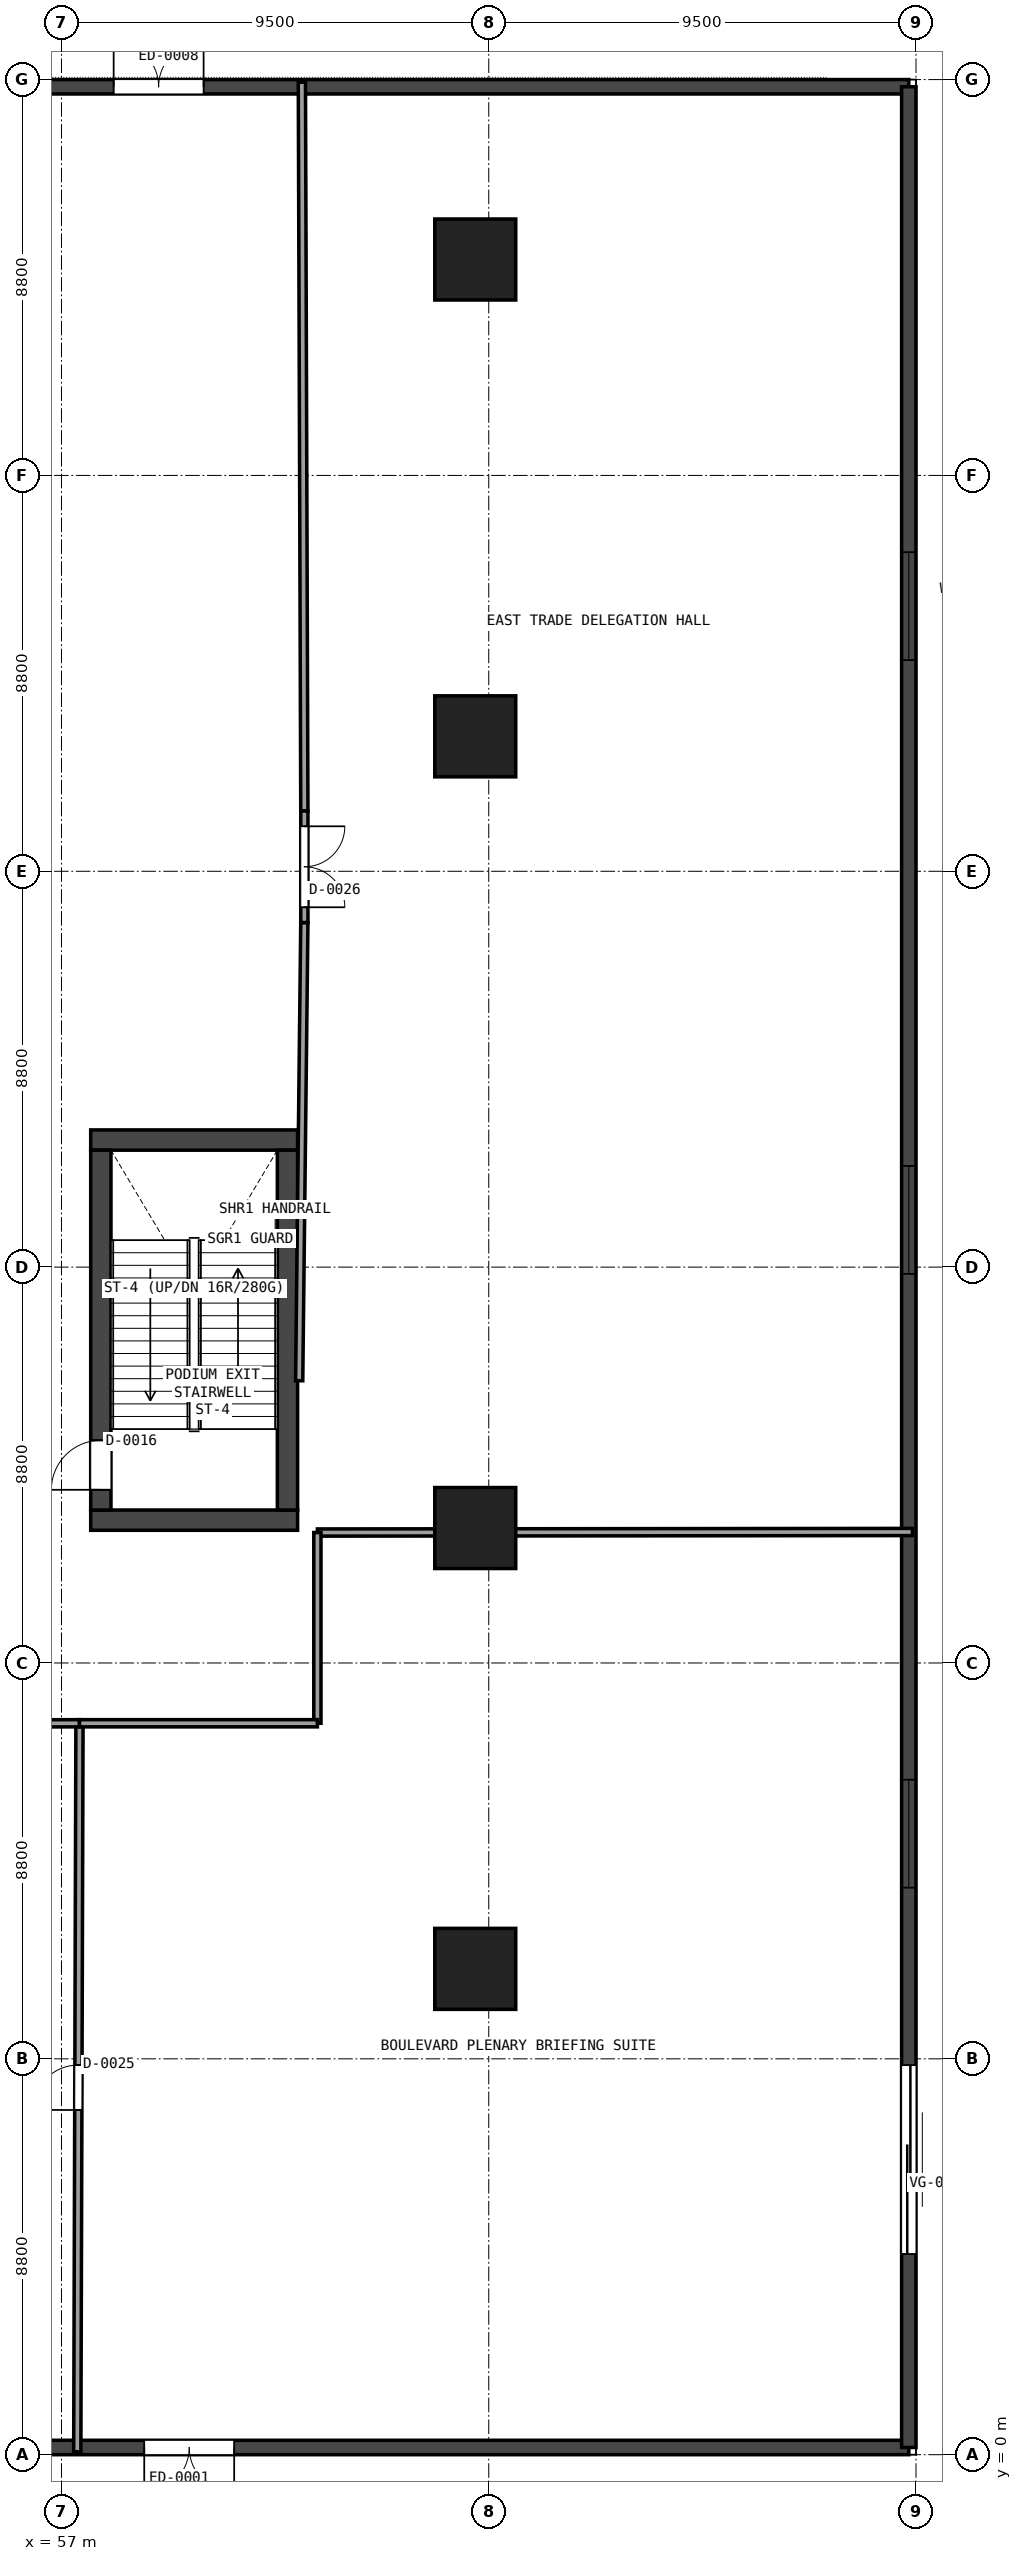
"""IFC4 building model, lengths in metres.
Left out: names, types, materials, properties, quantities, classifications, styles, units other than length and angle.
Written with IfcOpenShell. Run it as: python <this file> out.ifc"""

import sys

from ifc_helpers import new_model, si_unit, direction, frame, frame_2d, origin, origin_2d, place, context, subcontext, project, spatial, rectangle, extrude, element, fill, save


model = new_model("IFC4")
c1 = context("Model", 3, precision=1e-05, world=origin(), true_north=direction((0.0, 1.0)))
c2 = subcontext(c1, "Body", "Model", "MODEL_VIEW")
j1 = project(units=[si_unit("LENGTHUNIT", "METRE"), si_unit("PLANEANGLEUNIT", "RADIAN")], contexts=[c1])
p1 = place(None, origin())
s1 = spatial("IfcSite", under=j1, at=p1, CompositionType="ELEMENT")
p2 = place(p1, origin())
s2 = spatial("IfcBuilding", under=s1, at=p2, CompositionType="ELEMENT")
p3 = place(p2, origin())
s3 = spatial("IfcBuildingStorey", under=s2, at=p3, CompositionType="ELEMENT", Elevation=0.0)
for number, where, z_axis, x_axis in (
    (1, (57.65, 20.775, 0.0), (0.0, 0.0, 1.0), (1.0, 0.0, 0.0)),
    (2, (57.65, 29.225, 0.0), (0.0, 0.0, 1.0), (1.0, 0.0, 0.0)),
):
    element("IfcWall", number, at=place(p3, frame(where, z_axis=z_axis, x_axis=x_axis)), inside=s3, PredefinedType="SHEAR", context=c2, shape_type="SweptSolid", body=[
        extrude(rectangle(XDim=4.6, YDim=0.45, at=frame_2d((2.3, 0.0))), origin(), (0.0, 0.0, 1.0), 5.05),
    ])
p4 = place(p3, frame((57.875, 21.0, 0.0), z_axis=(0.0, 0.0, 1.0), x_axis=(0.0, 1.0, 0.0)))
e3 = element("IfcWall", 3, at=p4, inside=s3, PredefinedType="SHEAR", context=c2, shape_type="SweptSolid", body=[
    extrude(rectangle(XDim=8.0, YDim=0.45, at=frame_2d((4.0, 0.0))), origin(), (0.0, 0.0, 1.0), 5.05),
])
p5 = place(p4, frame((0.45, 0.0, 0.0)))
e4 = element("IfcOpeningElement", 4, at=p5, cuts=e3, PredefinedType="OPENING", context=c2, shape_type="SweptSolid", body=[
    extrude(rectangle(XDim=1.1, YDim=2.15, at=frame_2d((0.55, 1.075))), frame((0.0, 0.235, 0.0), z_axis=(0.0, -1.0, 0.0), x_axis=(1.0, 0.0, 0.0)), (0.0, 0.0, 1.0), 0.47),
])
p6 = place(p3, frame((62.025, 21.0, 0.0), z_axis=(0.0, 0.0, 1.0), x_axis=(0.0, 1.0, 0.0)))
e5 = element("IfcWall", 5, at=p6, inside=s3, PredefinedType="SHEAR", context=c2, shape_type="SweptSolid", body=[
    extrude(rectangle(XDim=8.0, YDim=0.45, at=frame_2d((4.0, 0.0))), origin(), (0.0, 0.0, 1.0), 5.05),
])
for number, where, z_axis, x_axis in (
    (6, (66.2, 10.8, 0.0), (0.0, 0.0, 1.0), (1.0, 0.0, 0.0)),
    (7, (66.2, 20.6, 0.0), (0.0, 0.0, 1.0), (1.0, 0.0, 0.0)),
    (8, (66.2, 38.2, 0.0), (0.0, 0.0, 1.0), (1.0, 0.0, 0.0)),
    (9, (66.2, 48.8, 0.0), (0.0, 0.0, 1.0), (1.0, 0.0, 0.0)),
):
    element("IfcColumn", number, at=place(p3, frame(where, z_axis=z_axis, x_axis=x_axis)), inside=s3, PredefinedType="COLUMN", context=c2, shape_type="SweptSolid", body=[
        extrude(rectangle(XDim=1.8, YDim=1.8, at=origin_2d()), origin(), (0.0, 0.0, 1.0), 5.05),
    ])
p7 = place(p3, frame((75.84, 0.16, 0.0), z_axis=(0.0, 0.0, 1.0), x_axis=(-1.0, 0.0, 0.0)))
e10 = element("IfcWall", 10, at=p7, inside=s3, PredefinedType="SOLIDWALL", context=c2, shape_type="SweptSolid", body=[
    extrude(rectangle(XDim=75.68, YDim=0.32, at=frame_2d((37.84, 0.0))), origin(), (0.0, 0.0, 1.0), 5.05),
])
p8 = place(p7, frame((15.0, 0.0, 0.0)))
e11 = element("IfcOpeningElement", 11, at=p8, cuts=e10, PredefinedType="OPENING", context=c2, shape_type="SweptSolid", body=[
    extrude(rectangle(XDim=2.0, YDim=2.4, at=frame_2d((1.0, 1.2))), frame((0.0, 0.17, 0.0), z_axis=(0.0, -1.0, 0.0), x_axis=(1.0, 0.0, 0.0)), (0.0, 0.0, 1.0), 0.34),
])
p9 = place(p7, frame((29.5, 0.0, 0.0)))
e12 = element("IfcOpeningElement", 12, at=p9, cuts=e10, PredefinedType="OPENING", context=c2, shape_type="SweptSolid", body=[
    extrude(rectangle(XDim=2.0, YDim=2.4, at=frame_2d((1.0, 1.2))), frame((0.0, 0.17, 0.0), z_axis=(0.0, -1.0, 0.0), x_axis=(1.0, 0.0, 0.0)), (0.0, 0.0, 1.0), 0.34),
])
p10 = place(p7, frame((42.5, 0.0, 0.0)))
e13 = element("IfcOpeningElement", 13, at=p10, cuts=e10, PredefinedType="OPENING", context=c2, shape_type="SweptSolid", body=[
    extrude(rectangle(XDim=2.0, YDim=2.4, at=frame_2d((1.0, 1.2))), frame((0.0, 0.17, 0.0), z_axis=(0.0, -1.0, 0.0), x_axis=(1.0, 0.0, 0.0)), (0.0, 0.0, 1.0), 0.34),
])
p11 = place(p7, frame((58.0, 0.0, 0.0)))
e14 = element("IfcOpeningElement", 14, at=p11, cuts=e10, PredefinedType="OPENING", context=c2, shape_type="SweptSolid", body=[
    extrude(rectangle(XDim=2.0, YDim=2.4, at=frame_2d((1.0, 1.2))), frame((0.0, 0.17, 0.0), z_axis=(0.0, -1.0, 0.0), x_axis=(1.0, 0.0, 0.0)), (0.0, 0.0, 1.0), 0.34),
])
p12 = place(p3, frame((0.16, 52.64, 0.0), z_axis=(0.0, 0.0, 1.0), x_axis=(1.0, 0.0, 0.0)))
e15 = element("IfcWall", 15, at=p12, inside=s3, PredefinedType="SOLIDWALL", context=c2, shape_type="SweptSolid", body=[
    extrude(rectangle(XDim=75.68, YDim=0.32, at=frame_2d((37.84, 0.0))), origin(), (0.0, 0.0, 1.0), 5.05),
])
p13 = place(p12, frame((15.0, 0.0, 0.0)))
e16 = element("IfcOpeningElement", 16, at=p13, cuts=e15, PredefinedType="OPENING", context=c2, shape_type="SweptSolid", body=[
    extrude(rectangle(XDim=2.0, YDim=2.4, at=frame_2d((1.0, 1.2))), frame((0.0, 0.17, 0.0), z_axis=(0.0, -1.0, 0.0), x_axis=(1.0, 0.0, 0.0)), (0.0, 0.0, 1.0), 0.34),
])
p14 = place(p12, frame((29.5, 0.0, 0.0)))
e17 = element("IfcOpeningElement", 17, at=p14, cuts=e15, PredefinedType="OPENING", context=c2, shape_type="SweptSolid", body=[
    extrude(rectangle(XDim=2.0, YDim=2.4, at=frame_2d((1.0, 1.2))), frame((0.0, 0.17, 0.0), z_axis=(0.0, -1.0, 0.0), x_axis=(1.0, 0.0, 0.0)), (0.0, 0.0, 1.0), 0.34),
])
p15 = place(p12, frame((42.5, 0.0, 0.0)))
e18 = element("IfcOpeningElement", 18, at=p15, cuts=e15, PredefinedType="OPENING", context=c2, shape_type="SweptSolid", body=[
    extrude(rectangle(XDim=2.0, YDim=2.4, at=frame_2d((1.0, 1.2))), frame((0.0, 0.17, 0.0), z_axis=(0.0, -1.0, 0.0), x_axis=(1.0, 0.0, 0.0)), (0.0, 0.0, 1.0), 0.34),
])
p16 = place(p12, frame((58.0, 0.0, 0.0)))
e19 = element("IfcOpeningElement", 19, at=p16, cuts=e15, PredefinedType="OPENING", context=c2, shape_type="SweptSolid", body=[
    extrude(rectangle(XDim=2.0, YDim=2.4, at=frame_2d((1.0, 1.2))), frame((0.0, 0.17, 0.0), z_axis=(0.0, -1.0, 0.0), x_axis=(1.0, 0.0, 0.0)), (0.0, 0.0, 1.0), 0.34),
])
p17 = place(p3, frame((75.84, 52.64, 0.0), z_axis=(0.0, 0.0, 1.0), x_axis=(0.0, -1.0, 0.0)))
e20 = element("IfcWall", 20, at=p17, inside=s3, PredefinedType="SOLIDWALL", context=c2, shape_type="SweptSolid", body=[
    extrude(rectangle(XDim=52.48, YDim=0.32, at=frame_2d((26.24, 0.0))), origin(), (0.0, 0.0, 1.0), 5.05),
])
p18 = place(p17, frame((10.346, 0.0, 0.95)))
e21 = element("IfcOpeningElement", 21, at=p18, cuts=e20, PredefinedType="OPENING", context=c2, shape_type="SweptSolid", body=[
    extrude(rectangle(XDim=2.4, YDim=2.5, at=frame_2d((1.2, 1.25))), frame((0.0, 0.17, 0.0), z_axis=(0.0, -1.0, 0.0), x_axis=(1.0, 0.0, 0.0)), (0.0, 0.0, 1.0), 0.34),
])
p19 = place(p17, frame((23.99, 0.0, 0.95)))
e22 = element("IfcOpeningElement", 22, at=p19, cuts=e20, PredefinedType="OPENING", context=c2, shape_type="SweptSolid", body=[
    extrude(rectangle(XDim=2.4, YDim=2.5, at=frame_2d((1.2, 1.25))), frame((0.0, 0.17, 0.0), z_axis=(0.0, -1.0, 0.0), x_axis=(1.0, 0.0, 0.0)), (0.0, 0.0, 1.0), 0.34),
])
p20 = place(p17, frame((37.635, 0.0, 0.95)))
e23 = element("IfcOpeningElement", 23, at=p20, cuts=e20, PredefinedType="OPENING", context=c2, shape_type="SweptSolid", body=[
    extrude(rectangle(XDim=2.4, YDim=2.5, at=frame_2d((1.2, 1.25))), frame((0.0, 0.17, 0.0), z_axis=(0.0, -1.0, 0.0), x_axis=(1.0, 0.0, 0.0)), (0.0, 0.0, 1.0), 0.34),
])
p21 = place(p17, frame((43.98, 0.0, 0.0)))
e24 = element("IfcOpeningElement", 24, at=p21, cuts=e20, PredefinedType="OPENING", context=c2, shape_type="SweptSolid", body=[
    extrude(rectangle(XDim=4.2, YDim=3.8, at=frame_2d((2.1, 1.9))), frame((0.0, 0.17, 0.0), z_axis=(0.0, -1.0, 0.0), x_axis=(1.0, 0.0, 0.0)), (0.0, 0.0, 1.0), 0.34),
])
p22 = place(p3, frame((57.351, 0.064, 0.0), z_axis=(0.0, 0.0, 1.0), x_axis=(0.003014804129, 0.999995455468, 0.0)))
e25 = element("IfcWall", 25, at=p22, inside=s3, PredefinedType="PARTITIONING", context=c2, shape_type="SweptSolid", body=[
    extrude(rectangle(XDim=16.196, YDim=0.16, at=frame_2d((8.098, 0.0))), origin(), (0.0, 0.0, 1.0), 4.123),
])
p23 = place(p22, frame((7.598, 0.0, 0.0)))
e26 = element("IfcOpeningElement", 26, at=p23, cuts=e25, PredefinedType="OPENING", context=c2, shape_type="SweptSolid", body=[
    extrude(rectangle(XDim=1.0, YDim=2.15, at=frame_2d((0.5, 1.075))), frame((0.0, 0.09, 0.0), z_axis=(0.0, -1.0, 0.0), x_axis=(1.0, 0.0, 0.0)), (0.0, 0.0, 1.0), 0.18),
])
p24 = place(p3, frame((57.4, 16.26, 0.0), z_axis=(0.0, 0.0, 1.0), x_axis=(-0.999997248031, -0.002346045786, 0.0)))
e27 = element("IfcWall", 27, at=p24, inside=s3, PredefinedType="PARTITIONING", context=c2, shape_type="SweptSolid", body=[
    extrude(rectangle(XDim=25.6, YDim=0.16, at=frame_2d((12.8, 0.0))), origin(), (0.0, 0.0, 1.0), 4.135),
])
p25 = place(p24, frame((12.3, 0.0, 0.0)))
e28 = element("IfcOpeningElement", 28, at=p25, cuts=e27, PredefinedType="OPENING", context=c2, shape_type="SweptSolid", body=[
    extrude(rectangle(XDim=1.0, YDim=2.15, at=frame_2d((0.5, 1.075))), frame((0.0, 0.09, 0.0), z_axis=(0.0, -1.0, 0.0), x_axis=(1.0, 0.0, 0.0)), (0.0, 0.0, 1.0), 0.18),
])
p26 = place(p3, frame((75.921, 20.512, 0.0), z_axis=(0.0, 0.0, 1.0), x_axis=(-0.999999591248, -0.000904158762, 0.0)))
e29 = element("IfcWall", 29, at=p26, inside=s3, PredefinedType="PARTITIONING", context=c2, shape_type="SweptSolid", body=[
    extrude(rectangle(XDim=13.231, YDim=0.16, at=frame_2d((6.615, 0.0))), origin(), (0.0, 0.0, 1.0), 4.135),
])
p27 = place(p3, frame((62.69, 20.5, 0.0), z_axis=(0.0, 0.0, 1.0), x_axis=(0.0, -1.0, 0.0)))
e30 = element("IfcWall", 30, at=p27, inside=s3, PredefinedType="PARTITIONING", context=c2, shape_type="SweptSolid", body=[
    extrude(rectangle(XDim=4.24, YDim=0.16, at=frame_2d((2.12, 0.0))), origin(), (0.0, 0.0, 1.0), 4.135),
])
p28 = place(p3, frame((62.69, 16.26, 0.0), z_axis=(0.0, 0.0, 1.0), x_axis=(-1.0, 0.0, 0.0)))
e31 = element("IfcWall", 31, at=p28, inside=s3, PredefinedType="PARTITIONING", context=c2, shape_type="SweptSolid", body=[
    extrude(rectangle(XDim=5.29, YDim=0.16, at=frame_2d((2.645, 0.0))), origin(), (0.0, 0.0, 1.0), 5.05),
])
p29 = place(p3, frame((62.4, 34.06, 0.0), z_axis=(0.0, 0.0, 1.0), x_axis=(-0.011289371125, -0.999936273019, 0.0)))
e32 = element("IfcWall", 32, at=p29, inside=s3, PredefinedType="PARTITIONING", context=c2, shape_type="SweptSolid", body=[
    extrude(rectangle(XDim=10.186, YDim=0.16, at=frame_2d((5.093, 0.0))), origin(), (0.0, 0.0, 1.0), 5.05),
])
p30 = place(p3, frame((62.345, 52.742, 0.0), z_axis=(0.0, 0.0, 1.0), x_axis=(0.003390423983, -0.999994252496, 0.0)))
e33 = element("IfcWall", 33, at=p30, inside=s3, PredefinedType="PARTITIONING", context=c2, shape_type="SweptSolid", body=[
    extrude(rectangle(XDim=16.202, YDim=0.16, at=frame_2d((8.101, 0.0))), origin(), (0.0, 0.0, 1.0), 4.123),
])
p31 = place(p3, frame((62.4, 36.54, 0.0), z_axis=(0.0, 0.0, 1.0), x_axis=(0.0, -1.0, 0.0)))
e34 = element("IfcWall", 34, at=p31, inside=s3, PredefinedType="PARTITIONING", context=c2, shape_type="SweptSolid", body=[
    extrude(rectangle(XDim=2.48, YDim=0.16, at=frame_2d((1.24, 0.0))), origin(), (0.0, 0.0, 1.0), 4.679),
])
p32 = place(p31, frame((0.34, 0.0, 0.0)))
e35 = element("IfcOpeningElement", 35, at=p32, cuts=e34, PredefinedType="OPENING", context=c2, shape_type="SweptSolid", body=[
    extrude(rectangle(XDim=1.8, YDim=2.25, at=frame_2d((0.9, 1.125))), frame((0.0, 0.09, 0.0), z_axis=(0.0, -1.0, 0.0), x_axis=(1.0, 0.0, 0.0)), (0.0, 0.0, 1.0), 0.18),
])
p33 = place(p18, origin())
e36 = element("IfcWindow", 36, at=p33, inside=s3, PartitioningType="SINGLE_PANEL", PredefinedType="WINDOW", context=c2, shape_type="SweptSolid", body=[
    extrude(rectangle(XDim=2.4, YDim=2.5, at=frame_2d((1.2, 1.25))), frame((0.0, 0.03, 0.0), z_axis=(0.0, -1.0, 0.0), x_axis=(1.0, 0.0, 0.0)), (0.0, 0.0, 1.0), 0.06),
])
fill(e21, e36)
p34 = place(p19, origin())
e37 = element("IfcWindow", 37, at=p34, inside=s3, PartitioningType="SINGLE_PANEL", PredefinedType="WINDOW", context=c2, shape_type="SweptSolid", body=[
    extrude(rectangle(XDim=2.4, YDim=2.5, at=frame_2d((1.2, 1.25))), frame((0.0, 0.03, 0.0), z_axis=(0.0, -1.0, 0.0), x_axis=(1.0, 0.0, 0.0)), (0.0, 0.0, 1.0), 0.06),
])
fill(e22, e37)
p35 = place(p20, origin())
e38 = element("IfcWindow", 38, at=p35, inside=s3, PartitioningType="SINGLE_PANEL", PredefinedType="WINDOW", context=c2, shape_type="SweptSolid", body=[
    extrude(rectangle(XDim=2.4, YDim=2.5, at=frame_2d((1.2, 1.25))), frame((0.0, 0.03, 0.0), z_axis=(0.0, -1.0, 0.0), x_axis=(1.0, 0.0, 0.0)), (0.0, 0.0, 1.0), 0.06),
])
fill(e23, e38)
p36 = place(p21, origin())
e39 = element("IfcDoor", 39, at=p36, inside=s3, OperationType="SLIDING_TO_LEFT", PredefinedType="GATE", context=c2, shape_type="SweptSolid", body=[
    extrude(rectangle(XDim=4.2, YDim=3.8, at=frame_2d((2.1, 1.9))), frame((0.0, 0.025, 0.0), z_axis=(0.0, -1.0, 0.0), x_axis=(1.0, 0.0, 0.0)), (0.0, 0.0, 1.0), 0.05),
])
fill(e24, e39)
p37 = place(p8, origin())
e40 = element("IfcDoor", 40, at=p37, inside=s3, OperationType="DOUBLE_DOOR_SINGLE_SWING", PredefinedType="DOOR", context=c2, shape_type="SweptSolid", body=[
    extrude(rectangle(XDim=2.0, YDim=2.4, at=frame_2d((1.0, 1.2))), frame((0.0, 0.025, 0.0), z_axis=(0.0, -1.0, 0.0), x_axis=(1.0, 0.0, 0.0)), (0.0, 0.0, 1.0), 0.05),
])
fill(e11, e40)
p38 = place(p16, origin())
e41 = element("IfcDoor", 41, at=p38, inside=s3, OperationType="DOUBLE_DOOR_SINGLE_SWING", PredefinedType="DOOR", context=c2, shape_type="SweptSolid", body=[
    extrude(rectangle(XDim=2.0, YDim=2.4, at=frame_2d((1.0, 1.2))), frame((0.0, 0.025, 0.0), z_axis=(0.0, -1.0, 0.0), x_axis=(1.0, 0.0, 0.0)), (0.0, 0.0, 1.0), 0.05),
])
fill(e19, e41)
p39 = place(p5, origin())
e42 = element("IfcDoor", 42, at=p39, inside=s3, OperationType="SINGLE_SWING_LEFT", PredefinedType="DOOR", context=c2, shape_type="SweptSolid", body=[
    extrude(rectangle(XDim=1.1, YDim=2.15, at=frame_2d((0.55, 1.075))), frame((0.0, 0.025, 0.0), z_axis=(0.0, -1.0, 0.0), x_axis=(1.0, 0.0, 0.0)), (0.0, 0.0, 1.0), 0.05),
])
fill(e4, e42)
p40 = place(p23, origin())
e43 = element("IfcDoor", 43, at=p40, inside=s3, OperationType="SINGLE_SWING_LEFT", PredefinedType="DOOR", context=c2, shape_type="SweptSolid", body=[
    extrude(rectangle(XDim=1.0, YDim=2.15, at=frame_2d((0.5, 1.075))), frame((0.0, 0.025, 0.0), z_axis=(0.0, -1.0, 0.0), x_axis=(1.0, 0.0, 0.0)), (0.0, 0.0, 1.0), 0.05),
])
fill(e26, e43)
p41 = place(p32, origin())
e44 = element("IfcDoor", 44, at=p41, inside=s3, OperationType="DOUBLE_DOOR_SINGLE_SWING", PredefinedType="DOOR", context=c2, shape_type="SweptSolid", body=[
    extrude(rectangle(XDim=1.8, YDim=2.25, at=frame_2d((0.9, 1.125))), frame((0.0, 0.025, 0.0), z_axis=(0.0, -1.0, 0.0), x_axis=(1.0, 0.0, 0.0)), (0.0, 0.0, 1.0), 0.05),
])
fill(e35, e44)
save(model, sys.argv[1])
